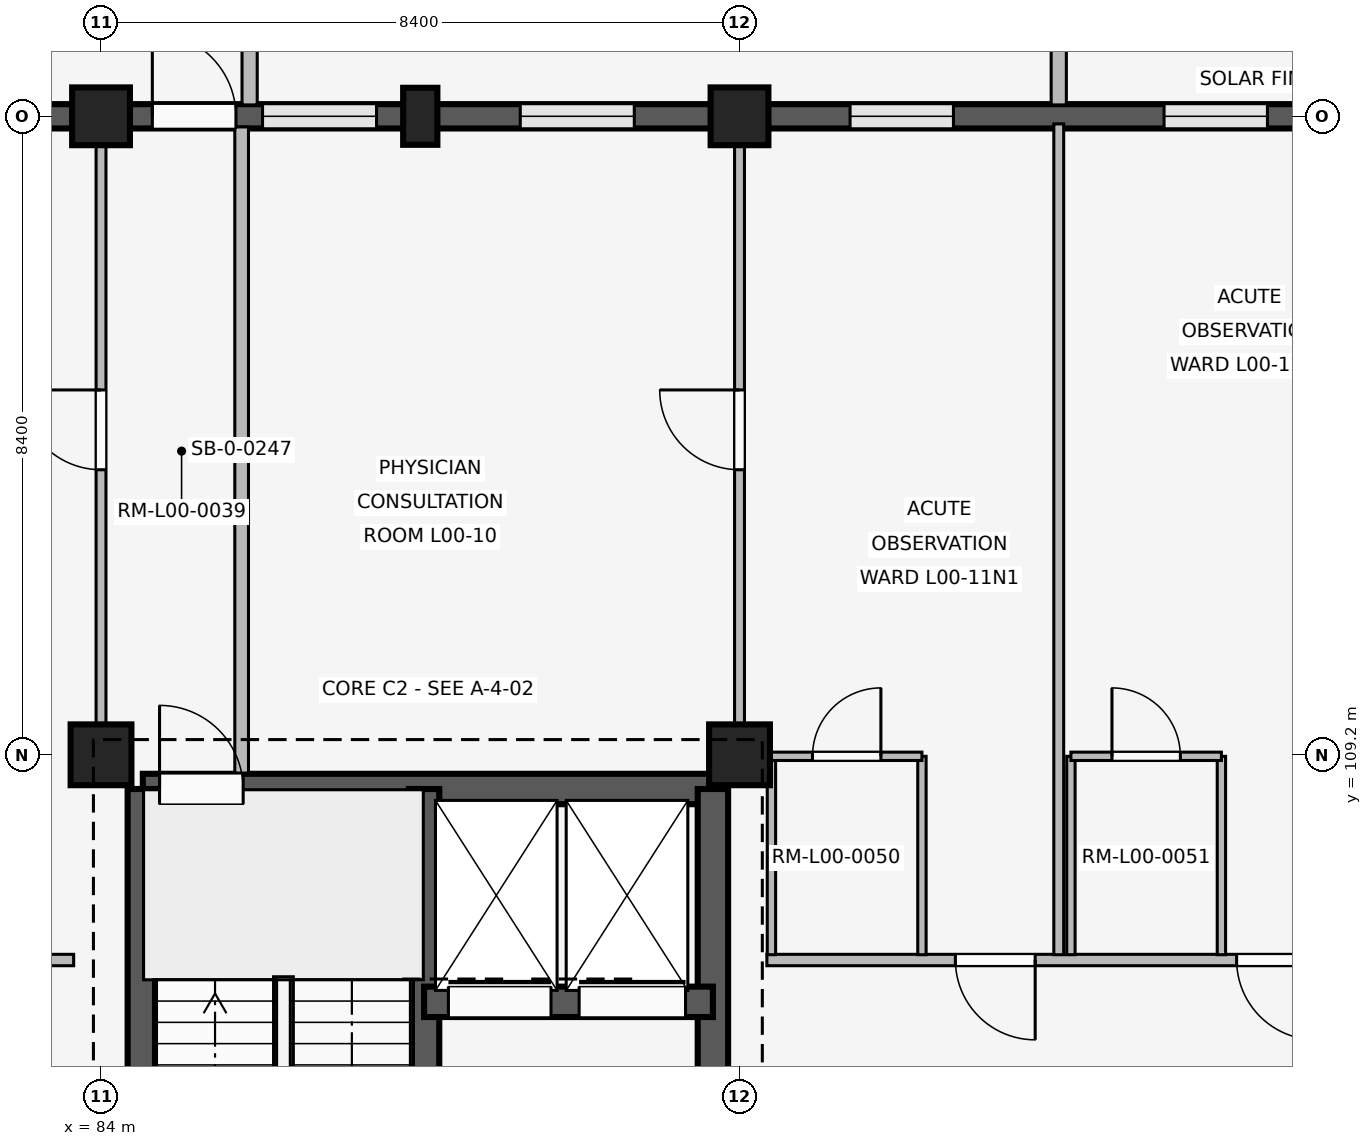
"""IFC4 building model, lengths in metres.
Left out: names, types, materials, properties, quantities, classifications, styles, units other than length and angle.
Written with IfcOpenShell. Run it as: python <this file> out.ifc"""

import sys

from ifc_helpers import new_model, si_unit, direction, frame, frame_2d, origin, origin_2d, place, context, subcontext, project, spatial, rectangle, extrude, element, fill, save


model = new_model("IFC4")
c1 = context("Model", 3, precision=1e-05, world=origin(), true_north=direction((0.0, 1.0)))
c2 = subcontext(c1, "Body", "Model", "MODEL_VIEW")
j1 = project(units=[si_unit("LENGTHUNIT", "METRE"), si_unit("PLANEANGLEUNIT", "RADIAN")], contexts=[c1])
p1 = place(None, origin())
s1 = spatial("IfcSite", under=j1, at=p1, CompositionType="ELEMENT")
p2 = place(p1, origin())
s2 = spatial("IfcBuilding", under=s1, at=p2, CompositionType="ELEMENT")
p3 = place(p2, origin())
s3 = spatial("IfcBuildingStorey", under=s2, at=p3, CompositionType="ELEMENT", Elevation=0.0)
p4 = place(p3, frame((84.0, 109.2, 0.0), z_axis=(0.0, 0.0, 1.0), x_axis=(1.0, 0.0, 0.0)))
e1 = element("IfcColumn", 1, at=p4, inside=s3, PredefinedType="COLUMN", context=c2, shape_type="SweptSolid", body=[
    extrude(rectangle(XDim=0.8, YDim=0.8, at=origin_2d()), origin(), (0.0, 0.0, 1.0), 4.8),
])
p5 = place(p3, frame((84.0, 117.6, 0.0), z_axis=(0.0, 0.0, 1.0), x_axis=(1.0, 0.0, 0.0)))
e2 = element("IfcColumn", 2, at=p5, inside=s3, PredefinedType="COLUMN", context=c2, shape_type="SweptSolid", body=[
    extrude(rectangle(XDim=0.76, YDim=0.76, at=origin_2d()), origin(), (0.0, 0.0, 1.0), 4.8),
])
p6 = place(p3, frame((92.4, 109.2, 0.0), z_axis=(0.0, 0.0, 1.0), x_axis=(1.0, 0.0, 0.0)))
e3 = element("IfcColumn", 3, at=p6, inside=s3, PredefinedType="COLUMN", context=c2, shape_type="SweptSolid", body=[
    extrude(rectangle(XDim=0.8, YDim=0.8, at=origin_2d()), origin(), (0.0, 0.0, 1.0), 4.8),
])
p7 = place(p3, frame((92.4, 117.6, 0.0), z_axis=(0.0, 0.0, 1.0), x_axis=(1.0, 0.0, 0.0)))
e4 = element("IfcColumn", 4, at=p7, inside=s3, PredefinedType="COLUMN", context=c2, shape_type="SweptSolid", body=[
    extrude(rectangle(XDim=0.76, YDim=0.76, at=origin_2d()), origin(), (0.0, 0.0, 1.0), 4.8),
])
p8 = place(p3, frame((88.2, 117.6, 0.0), z_axis=(0.0, 0.0, 1.0), x_axis=(1.0, 0.0, 0.0)))
e5 = element("IfcColumn", 5, at=p8, inside=s3, PredefinedType="PILASTER", context=c2, shape_type="SweptSolid", body=[
    extrude(rectangle(XDim=0.45, YDim=0.75, at=origin_2d()), origin(), (0.0, 0.0, 1.0), 4.8),
])
p9 = place(p3, frame((75.975, 117.6, 0.0), z_axis=(0.0, 0.0, 1.0), x_axis=(1.0, 0.0, 0.0)))
e6 = element("IfcWall", 6, at=p9, inside=s3, PredefinedType="SOLIDWALL", context=c2, shape_type="SweptSolid", body=[
    extrude(rectangle(XDim=7.65, YDim=0.32, at=frame_2d((3.825, 0.0))), origin(), (0.0, 0.0, 1.0), 3.82),
])
p10 = place(p9, frame((2.825, 0.0, 0.0)))
e7 = element("IfcOpeningElement", 7, at=p10, cuts=e6, PredefinedType="OPENING", context=c2, shape_type="SweptSolid", body=[
    extrude(rectangle(XDim=2.0, YDim=2.4, at=frame_2d((1.0, 1.2))), frame((0.0, 0.17, 0.0), z_axis=(0.0, -1.0, 0.0), x_axis=(1.0, 0.0, 0.0)), (0.0, 0.0, 1.0), 0.34),
])
p11 = place(p3, frame((84.375, 117.6, 0.0), z_axis=(0.0, 0.0, 1.0), x_axis=(1.0, 0.0, 0.0)))
e8 = element("IfcWall", 8, at=p11, inside=s3, PredefinedType="SOLIDWALL", context=c2, shape_type="SweptSolid", body=[
    extrude(rectangle(XDim=7.65, YDim=0.32, at=frame_2d((3.825, 0.0))), origin(), (0.0, 0.0, 1.0), 3.82),
])
p12 = place(p11, frame((0.3, 0.0, 0.0)))
e9 = element("IfcOpeningElement", 9, at=p12, cuts=e8, PredefinedType="OPENING", context=c2, shape_type="SweptSolid", body=[
    extrude(rectangle(XDim=1.1, YDim=2.15, at=frame_2d((0.55, 1.075))), frame((0.0, 0.17, 0.0), z_axis=(0.0, -1.0, 0.0), x_axis=(1.0, 0.0, 0.0)), (0.0, 0.0, 1.0), 0.34),
])
p13 = place(p11, frame((1.75, 0.0, 0.85)))
e10 = element("IfcOpeningElement", 10, at=p13, cuts=e8, PredefinedType="OPENING", context=c2, shape_type="SweptSolid", body=[
    extrude(rectangle(XDim=1.5, YDim=1.55, at=frame_2d((0.75, 0.775))), frame((0.0, 0.17, 0.0), z_axis=(0.0, -1.0, 0.0), x_axis=(1.0, 0.0, 0.0)), (0.0, 0.0, 1.0), 0.34),
])
p14 = place(p11, frame((5.14, 0.0, 0.85)))
e11 = element("IfcOpeningElement", 11, at=p14, cuts=e8, PredefinedType="OPENING", context=c2, shape_type="SweptSolid", body=[
    extrude(rectangle(XDim=1.5, YDim=1.55, at=frame_2d((0.75, 0.775))), frame((0.0, 0.17, 0.0), z_axis=(0.0, -1.0, 0.0), x_axis=(1.0, 0.0, 0.0)), (0.0, 0.0, 1.0), 0.34),
])
p15 = place(p3, frame((85.955, 117.75, 0.0), z_axis=(0.0, 0.0, 1.0), x_axis=(0.0, 1.0, 0.0)))
e12 = element("IfcWall", 12, at=p15, inside=s3, PredefinedType="ELEMENTEDWALL", context=c2, shape_type="SweptSolid", body=[
    extrude(rectangle(XDim=0.85, YDim=0.2, at=frame_2d((0.425, 0.0))), origin(), (0.0, 0.0, 1.0), 3.8),
])
p16 = place(p3, frame((92.775, 117.6, 0.0), z_axis=(0.0, 0.0, 1.0), x_axis=(1.0, 0.0, 0.0)))
e13 = element("IfcWall", 13, at=p16, inside=s3, PredefinedType="SOLIDWALL", context=c2, shape_type="SweptSolid", body=[
    extrude(rectangle(XDim=7.65, YDim=0.32, at=frame_2d((3.825, 0.0))), origin(), (0.0, 0.0, 1.0), 3.82),
])
p17 = place(p16, frame((1.08, 0.0, 0.85)))
e14 = element("IfcOpeningElement", 14, at=p17, cuts=e13, PredefinedType="OPENING", context=c2, shape_type="SweptSolid", body=[
    extrude(rectangle(XDim=1.36, YDim=1.42, at=frame_2d((0.68, 0.71))), frame((0.0, 0.17, 0.0), z_axis=(0.0, -1.0, 0.0), x_axis=(1.0, 0.0, 0.0)), (0.0, 0.0, 1.0), 0.34),
])
p18 = place(p16, frame((5.21, 0.0, 0.85)))
e15 = element("IfcOpeningElement", 15, at=p18, cuts=e13, PredefinedType="OPENING", context=c2, shape_type="SweptSolid", body=[
    extrude(rectangle(XDim=1.36, YDim=1.42, at=frame_2d((0.68, 0.71))), frame((0.0, 0.17, 0.0), z_axis=(0.0, -1.0, 0.0), x_axis=(1.0, 0.0, 0.0)), (0.0, 0.0, 1.0), 0.34),
])
p19 = place(p3, frame((96.6, 117.75, 0.0), z_axis=(0.0, 0.0, 1.0), x_axis=(0.0, 1.0, 0.0)))
e16 = element("IfcWall", 16, at=p19, inside=s3, PredefinedType="ELEMENTEDWALL", context=c2, shape_type="SweptSolid", body=[
    extrude(rectangle(XDim=0.85, YDim=0.2, at=frame_2d((0.425, 0.0))), origin(), (0.0, 0.0, 1.0), 3.8),
])
p20 = place(p3, frame((84.55, 108.75, 0.0), z_axis=(0.0, 0.0, 1.0), x_axis=(1.0, 0.0, 0.0)))
e17 = element("IfcWall", 17, at=p20, inside=s3, PredefinedType="SHEAR", context=c2, shape_type="SweptSolid", body=[
    extrude(rectangle(XDim=7.5, YDim=0.4, at=frame_2d((3.75, 0.0))), origin(), (0.0, 0.0, 1.0), 4.52),
])
p21 = place(p20, frame((0.22, 0.0, 0.0)))
e18 = element("IfcOpeningElement", 18, at=p21, cuts=e17, PredefinedType="OPENING", context=c2, shape_type="SweptSolid", body=[
    extrude(rectangle(XDim=1.1, YDim=2.1, at=frame_2d((0.55, 1.05))), frame((0.0, 0.21, 0.0), z_axis=(0.0, -1.0, 0.0), x_axis=(1.0, 0.0, 0.0)), (0.0, 0.0, 1.0), 0.42),
])
p22 = place(p3, frame((84.55, 101.2, 0.0), z_axis=(0.0, 0.0, 1.0), x_axis=(0.0, 1.0, 0.0)))
e19 = element("IfcWall", 19, at=p22, inside=s3, PredefinedType="SHEAR", context=c2, shape_type="SweptSolid", body=[
    extrude(rectangle(XDim=7.55, YDim=0.4, at=frame_2d((3.775, 0.0))), origin(), (0.0, 0.0, 1.0), 4.52),
])
p23 = place(p22, frame((0.28, 0.0, 0.0)))
e20 = element("IfcOpeningElement", 20, at=p23, cuts=e19, PredefinedType="OPENING", context=c2, shape_type="SweptSolid", body=[
    extrude(rectangle(XDim=1.0, YDim=2.15, at=frame_2d((0.5, 1.075))), frame((0.0, 0.21, 0.0), z_axis=(0.0, -1.0, 0.0), x_axis=(1.0, 0.0, 0.0)), (0.0, 0.0, 1.0), 0.42),
])
p24 = place(p3, frame((92.05, 101.2, 0.0), z_axis=(0.0, 0.0, 1.0), x_axis=(0.0, 1.0, 0.0)))
e21 = element("IfcWall", 21, at=p24, inside=s3, PredefinedType="SHEAR", context=c2, shape_type="SweptSolid", body=[
    extrude(rectangle(XDim=7.55, YDim=0.4, at=frame_2d((3.775, 0.0))), origin(), (0.0, 0.0, 1.0), 4.52),
])
p25 = place(p24, frame((2.4, 0.0, 0.0)))
e22 = element("IfcOpeningElement", 22, at=p25, cuts=e21, PredefinedType="OPENING", context=c2, shape_type="SweptSolid", body=[
    extrude(rectangle(XDim=1.2, YDim=2.2, at=frame_2d((0.6, 1.1))), frame((0.0, 0.21, 0.0), z_axis=(0.0, -1.0, 0.0), x_axis=(1.0, 0.0, 0.0)), (0.0, 0.0, 1.0), 0.42),
])
p26 = place(p3, frame((88.25, 101.2, 0.0), z_axis=(0.0, 0.0, 1.0), x_axis=(0.0, 1.0, 0.0)))
e23 = element("IfcWall", 23, at=p26, inside=s3, PredefinedType="SHEAR", context=c2, shape_type="SweptSolid", body=[
    extrude(rectangle(XDim=7.55, YDim=0.4, at=frame_2d((3.775, 0.0))), origin(), (0.0, 0.0, 1.0), 4.52),
])
p27 = place(p26, frame((0.28, 0.0, 0.0)))
e24 = element("IfcOpeningElement", 24, at=p27, cuts=e23, PredefinedType="OPENING", context=c2, shape_type="SweptSolid", body=[
    extrude(rectangle(XDim=1.0, YDim=2.15, at=frame_2d((0.5, 1.075))), frame((0.0, 0.21, 0.0), z_axis=(0.0, -1.0, 0.0), x_axis=(1.0, 0.0, 0.0)), (0.0, 0.0, 1.0), 0.42),
])
p28 = place(p3, frame((88.25, 105.95, 0.0), z_axis=(0.0, 0.0, 1.0), x_axis=(1.0, 0.0, 0.0)))
e25 = element("IfcWall", 25, at=p28, inside=s3, PredefinedType="SHEAR", context=c2, shape_type="SweptSolid", body=[
    extrude(rectangle(XDim=3.8, YDim=0.4, at=frame_2d((1.9, 0.0))), origin(), (0.0, 0.0, 1.0), 4.52),
])
p29 = place(p28, frame((0.32, 0.0, 0.0)))
e26 = element("IfcOpeningElement", 26, at=p29, cuts=e25, PredefinedType="OPENING", context=c2, shape_type="SweptSolid", body=[
    extrude(rectangle(XDim=1.35, YDim=2.25, at=frame_2d((0.675, 1.125))), frame((0.0, 0.21, 0.0), z_axis=(0.0, -1.0, 0.0), x_axis=(1.0, 0.0, 0.0)), (0.0, 0.0, 1.0), 0.42),
])
p30 = place(p28, frame((2.04, 0.0, 0.0)))
e27 = element("IfcOpeningElement", 27, at=p30, cuts=e25, PredefinedType="OPENING", context=c2, shape_type="SweptSolid", body=[
    extrude(rectangle(XDim=1.4, YDim=2.25, at=frame_2d((0.7, 1.125))), frame((0.0, 0.21, 0.0), z_axis=(0.0, -1.0, 0.0), x_axis=(1.0, 0.0, 0.0)), (0.0, 0.0, 1.0), 0.42),
])
p31 = place(p3, frame((83.64, 106.5, 0.0), z_axis=(0.0, 0.0, 1.0), x_axis=(-1.0, 0.0, 0.0)))
e28 = element("IfcWall", 28, at=p31, inside=s3, PredefinedType="PARTITIONING", context=c2, shape_type="SweptSolid", body=[
    extrude(rectangle(XDim=7.96, YDim=0.15, at=frame_2d((3.98, 0.0))), origin(), (0.0, 0.0, 1.0), 3.8),
])
p32 = place(p31, frame((3.355, 0.0, 0.0)))
e29 = element("IfcOpeningElement", 29, at=p32, cuts=e28, PredefinedType="OPENING", context=c2, shape_type="SweptSolid", body=[
    extrude(rectangle(XDim=1.25, YDim=2.2, at=frame_2d((0.625, 1.1))), frame((0.0, 0.085, 0.0), z_axis=(0.0, -1.0, 0.0), x_axis=(1.0, 0.0, 0.0)), (0.0, 0.0, 1.0), 0.17),
])
p33 = place(p3, frame((84.0, 109.55, 0.0), z_axis=(0.0, 0.0, 1.0), x_axis=(0.0, 1.0, 0.0)))
e30 = element("IfcWall", 30, at=p33, inside=s3, PredefinedType="PARTITIONING", context=c2, shape_type="SweptSolid", body=[
    extrude(rectangle(XDim=7.91, YDim=0.13, at=frame_2d((3.955, 0.0))), origin(), (0.0, 0.0, 1.0), 3.8),
])
p34 = place(p33, frame((3.4, 0.0, 0.0)))
e31 = element("IfcOpeningElement", 31, at=p34, cuts=e30, PredefinedType="OPENING", context=c2, shape_type="SweptSolid", body=[
    extrude(rectangle(XDim=1.05, YDim=2.2, at=frame_2d((0.525, 1.1))), frame((0.0, 0.075, 0.0), z_axis=(0.0, -1.0, 0.0), x_axis=(1.0, 0.0, 0.0)), (0.0, 0.0, 1.0), 0.15),
])
p35 = place(p3, frame((85.85, 108.96, 0.0), z_axis=(0.0, 0.0, 1.0), x_axis=(0.0, 1.0, 0.0)))
e32 = element("IfcWall", 32, at=p35, inside=s3, PredefinedType="PARTITIONING", context=c2, shape_type="SweptSolid", body=[
    extrude(rectangle(XDim=8.5, YDim=0.18, at=frame_2d((4.25, 0.0))), origin(), (0.0, 0.0, 1.0), 3.8),
])
p36 = place(p3, frame((92.4, 109.55, 0.0), z_axis=(0.0, 0.0, 1.0), x_axis=(0.0, 1.0, 0.0)))
e33 = element("IfcWall", 33, at=p36, inside=s3, PredefinedType="PARTITIONING", context=c2, shape_type="SweptSolid", body=[
    extrude(rectangle(XDim=7.91, YDim=0.13, at=frame_2d((3.955, 0.0))), origin(), (0.0, 0.0, 1.0), 3.8),
])
p37 = place(p36, frame((3.4, 0.0, 0.0)))
e34 = element("IfcOpeningElement", 34, at=p37, cuts=e33, PredefinedType="OPENING", context=c2, shape_type="SweptSolid", body=[
    extrude(rectangle(XDim=1.05, YDim=2.2, at=frame_2d((0.525, 1.1))), frame((0.0, 0.075, 0.0), z_axis=(0.0, -1.0, 0.0), x_axis=(1.0, 0.0, 0.0)), (0.0, 0.0, 1.0), 0.15),
])
p38 = place(p3, frame((100.72, 106.5, 0.0), z_axis=(0.0, 0.0, 1.0), x_axis=(-1.0, 0.0, 0.0)))
e35 = element("IfcWall", 35, at=p38, inside=s3, PredefinedType="PARTITIONING", context=c2, shape_type="SweptSolid", body=[
    extrude(rectangle(XDim=7.96, YDim=0.15, at=frame_2d((3.98, 0.0))), origin(), (0.0, 0.0, 1.0), 3.8),
])
p39 = place(p38, frame((0.73, 0.0, 0.0)))
e36 = element("IfcOpeningElement", 36, at=p39, cuts=e35, PredefinedType="OPENING", context=c2, shape_type="SweptSolid", body=[
    extrude(rectangle(XDim=1.05, YDim=2.2, at=frame_2d((0.525, 1.1))), frame((0.0, 0.085, 0.0), z_axis=(0.0, -1.0, 0.0), x_axis=(1.0, 0.0, 0.0)), (0.0, 0.0, 1.0), 0.17),
])
p40 = place(p38, frame((4.43, 0.0, 0.0)))
e37 = element("IfcOpeningElement", 37, at=p40, cuts=e35, PredefinedType="OPENING", context=c2, shape_type="SweptSolid", body=[
    extrude(rectangle(XDim=1.05, YDim=2.2, at=frame_2d((0.525, 1.1))), frame((0.0, 0.085, 0.0), z_axis=(0.0, -1.0, 0.0), x_axis=(1.0, 0.0, 0.0)), (0.0, 0.0, 1.0), 0.17),
])
p41 = place(p3, frame((96.6, 106.57, 0.0), z_axis=(0.0, 0.0, 1.0), x_axis=(0.0, 1.0, 0.0)))
e38 = element("IfcWall", 38, at=p41, inside=s3, PredefinedType="PARTITIONING", context=c2, shape_type="SweptSolid", body=[
    extrude(rectangle(XDim=10.93, YDim=0.13, at=frame_2d((5.465, 0.0))), origin(), (0.0, 0.0, 1.0), 3.8),
])
for number, where, z_axis, x_axis in (
    (39, (92.82, 106.57, 0.0), (0.0, 0.0, 1.0), (0.0, 1.0, 0.0)),
    (40, (94.8, 106.57, 0.0), (0.0, 0.0, 1.0), (0.0, 1.0, 0.0)),
):
    element("IfcWall", number, at=place(p3, frame(where, z_axis=z_axis, x_axis=x_axis)), inside=s3, PredefinedType="PARTITIONING", context=c2, shape_type="SweptSolid", body=[
        extrude(rectangle(XDim=2.61, YDim=0.11, at=frame_2d((1.305, 0.0))), origin(), (0.0, 0.0, 1.0), 3.8),
    ])
p42 = place(p3, frame((92.82, 109.18, 0.0), z_axis=(0.0, 0.0, 1.0), x_axis=(1.0, 0.0, 0.0)))
e41 = element("IfcWall", 41, at=p42, inside=s3, PredefinedType="PARTITIONING", context=c2, shape_type="SweptSolid", body=[
    extrude(rectangle(XDim=1.98, YDim=0.11, at=frame_2d((0.99, 0.0))), origin(), (0.0, 0.0, 1.0), 3.8),
])
p43 = place(p42, frame((0.54, 0.0, 0.0)))
e42 = element("IfcOpeningElement", 42, at=p43, cuts=e41, PredefinedType="OPENING", context=c2, shape_type="SweptSolid", body=[
    extrude(rectangle(XDim=0.9, YDim=2.1, at=frame_2d((0.45, 1.05))), frame((0.0, 0.065, 0.0), z_axis=(0.0, -1.0, 0.0), x_axis=(1.0, 0.0, 0.0)), (0.0, 0.0, 1.0), 0.13),
])
for number, where, z_axis, x_axis in (
    (43, (96.76, 106.57, 0.0), (0.0, 0.0, 1.0), (0.0, 1.0, 0.0)),
    (44, (98.74, 106.57, 0.0), (0.0, 0.0, 1.0), (0.0, 1.0, 0.0)),
):
    element("IfcWall", number, at=place(p3, frame(where, z_axis=z_axis, x_axis=x_axis)), inside=s3, PredefinedType="PARTITIONING", context=c2, shape_type="SweptSolid", body=[
        extrude(rectangle(XDim=2.61, YDim=0.11, at=frame_2d((1.305, 0.0))), origin(), (0.0, 0.0, 1.0), 3.8),
    ])
p44 = place(p3, frame((96.76, 109.18, 0.0), z_axis=(0.0, 0.0, 1.0), x_axis=(1.0, 0.0, 0.0)))
e45 = element("IfcWall", 45, at=p44, inside=s3, PredefinedType="PARTITIONING", context=c2, shape_type="SweptSolid", body=[
    extrude(rectangle(XDim=1.98, YDim=0.11, at=frame_2d((0.99, 0.0))), origin(), (0.0, 0.0, 1.0), 3.8),
])
p45 = place(p44, frame((0.54, 0.0, 0.0)))
e46 = element("IfcOpeningElement", 46, at=p45, cuts=e45, PredefinedType="OPENING", context=c2, shape_type="SweptSolid", body=[
    extrude(rectangle(XDim=0.9, YDim=2.1, at=frame_2d((0.45, 1.05))), frame((0.0, 0.065, 0.0), z_axis=(0.0, -1.0, 0.0), x_axis=(1.0, 0.0, 0.0)), (0.0, 0.0, 1.0), 0.13),
])
p46 = place(p12, origin())
e47 = element("IfcDoor", 47, at=p46, inside=s3, OperationType="SINGLE_SWING_LEFT", PredefinedType="DOOR", context=c2, shape_type="SweptSolid", body=[
    extrude(rectangle(XDim=1.1, YDim=2.15, at=frame_2d((0.55, 1.075))), frame((0.0, 0.025, 0.0), z_axis=(0.0, -1.0, 0.0), x_axis=(1.0, 0.0, 0.0)), (0.0, 0.0, 1.0), 0.05),
])
fill(e9, e47)
p47 = place(p13, origin())
e48 = element("IfcWindow", 48, at=p47, inside=s3, PartitioningType="SINGLE_PANEL", PredefinedType="WINDOW", context=c2, shape_type="SweptSolid", body=[
    extrude(rectangle(XDim=1.5, YDim=1.55, at=frame_2d((0.75, 0.775))), frame((0.0, 0.03, 0.0), z_axis=(0.0, -1.0, 0.0), x_axis=(1.0, 0.0, 0.0)), (0.0, 0.0, 1.0), 0.06),
])
fill(e10, e48)
p48 = place(p14, origin())
e49 = element("IfcWindow", 49, at=p48, inside=s3, PartitioningType="SINGLE_PANEL", PredefinedType="WINDOW", context=c2, shape_type="SweptSolid", body=[
    extrude(rectangle(XDim=1.5, YDim=1.55, at=frame_2d((0.75, 0.775))), frame((0.0, 0.03, 0.0), z_axis=(0.0, -1.0, 0.0), x_axis=(1.0, 0.0, 0.0)), (0.0, 0.0, 1.0), 0.06),
])
fill(e11, e49)
p49 = place(p17, origin())
e50 = element("IfcWindow", 50, at=p49, inside=s3, PartitioningType="SINGLE_PANEL", PredefinedType="WINDOW", context=c2, shape_type="SweptSolid", body=[
    extrude(rectangle(XDim=1.36, YDim=1.42, at=frame_2d((0.68, 0.71))), frame((0.0, 0.03, 0.0), z_axis=(0.0, -1.0, 0.0), x_axis=(1.0, 0.0, 0.0)), (0.0, 0.0, 1.0), 0.06),
])
fill(e14, e50)
p50 = place(p18, origin())
e51 = element("IfcWindow", 51, at=p50, inside=s3, PartitioningType="SINGLE_PANEL", PredefinedType="WINDOW", context=c2, shape_type="SweptSolid", body=[
    extrude(rectangle(XDim=1.36, YDim=1.42, at=frame_2d((0.68, 0.71))), frame((0.0, 0.03, 0.0), z_axis=(0.0, -1.0, 0.0), x_axis=(1.0, 0.0, 0.0)), (0.0, 0.0, 1.0), 0.06),
])
fill(e15, e51)
p51 = place(p21, origin())
e52 = element("IfcDoor", 52, at=p51, inside=s3, OperationType="SINGLE_SWING_LEFT", PredefinedType="DOOR", context=c2, shape_type="SweptSolid", body=[
    extrude(rectangle(XDim=1.1, YDim=2.1, at=frame_2d((0.55, 1.05))), frame((0.0, 0.025, 0.0), z_axis=(0.0, -1.0, 0.0), x_axis=(1.0, 0.0, 0.0)), (0.0, 0.0, 1.0), 0.05),
])
fill(e18, e52)
p52 = place(p29, origin())
e53 = element("IfcDoor", 53, at=p52, inside=s3, OperationType="SLIDING_TO_LEFT", PredefinedType="DOOR", context=c2, shape_type="SweptSolid", body=[
    extrude(rectangle(XDim=1.35, YDim=2.25, at=frame_2d((0.675, 1.125))), frame((0.0, 0.025, 0.0), z_axis=(0.0, -1.0, 0.0), x_axis=(1.0, 0.0, 0.0)), (0.0, 0.0, 1.0), 0.05),
])
fill(e26, e53)
p53 = place(p30, origin())
e54 = element("IfcDoor", 54, at=p53, inside=s3, OperationType="SLIDING_TO_LEFT", PredefinedType="DOOR", context=c2, shape_type="SweptSolid", body=[
    extrude(rectangle(XDim=1.4, YDim=2.25, at=frame_2d((0.7, 1.125))), frame((0.0, 0.025, 0.0), z_axis=(0.0, -1.0, 0.0), x_axis=(1.0, 0.0, 0.0)), (0.0, 0.0, 1.0), 0.05),
])
fill(e27, e54)
p54 = place(p34, origin())
e55 = element("IfcDoor", 55, at=p54, inside=s3, OperationType="SINGLE_SWING_RIGHT", PredefinedType="DOOR", context=c2, shape_type="SweptSolid", body=[
    extrude(rectangle(XDim=1.05, YDim=2.2, at=frame_2d((0.525, 1.1))), frame((0.0, 0.025, 0.0), z_axis=(0.0, -1.0, 0.0), x_axis=(1.0, 0.0, 0.0)), (0.0, 0.0, 1.0), 0.05),
])
fill(e31, e55)
p55 = place(p37, origin())
e56 = element("IfcDoor", 56, at=p55, inside=s3, OperationType="SINGLE_SWING_RIGHT", PredefinedType="DOOR", context=c2, shape_type="SweptSolid", body=[
    extrude(rectangle(XDim=1.05, YDim=2.2, at=frame_2d((0.525, 1.1))), frame((0.0, 0.025, 0.0), z_axis=(0.0, -1.0, 0.0), x_axis=(1.0, 0.0, 0.0)), (0.0, 0.0, 1.0), 0.05),
])
fill(e34, e56)
p56 = place(p39, origin())
e57 = element("IfcDoor", 57, at=p56, inside=s3, OperationType="SINGLE_SWING_LEFT", PredefinedType="DOOR", context=c2, shape_type="SweptSolid", body=[
    extrude(rectangle(XDim=1.05, YDim=2.2, at=frame_2d((0.525, 1.1))), frame((0.0, 0.025, 0.0), z_axis=(0.0, -1.0, 0.0), x_axis=(1.0, 0.0, 0.0)), (0.0, 0.0, 1.0), 0.05),
])
fill(e36, e57)
p57 = place(p40, origin())
e58 = element("IfcDoor", 58, at=p57, inside=s3, OperationType="SINGLE_SWING_LEFT", PredefinedType="DOOR", context=c2, shape_type="SweptSolid", body=[
    extrude(rectangle(XDim=1.05, YDim=2.2, at=frame_2d((0.525, 1.1))), frame((0.0, 0.025, 0.0), z_axis=(0.0, -1.0, 0.0), x_axis=(1.0, 0.0, 0.0)), (0.0, 0.0, 1.0), 0.05),
])
fill(e37, e58)
p58 = place(p43, origin())
e59 = element("IfcDoor", 59, at=p58, inside=s3, OperationType="SINGLE_SWING_RIGHT", PredefinedType="DOOR", context=c2, shape_type="SweptSolid", body=[
    extrude(rectangle(XDim=0.9, YDim=2.1, at=frame_2d((0.45, 1.05))), frame((0.0, 0.025, 0.0), z_axis=(0.0, -1.0, 0.0), x_axis=(1.0, 0.0, 0.0)), (0.0, 0.0, 1.0), 0.05),
])
fill(e42, e59)
p59 = place(p45, origin())
e60 = element("IfcDoor", 60, at=p59, inside=s3, OperationType="SINGLE_SWING_LEFT", PredefinedType="DOOR", context=c2, shape_type="SweptSolid", body=[
    extrude(rectangle(XDim=0.9, YDim=2.1, at=frame_2d((0.45, 1.05))), frame((0.0, 0.025, 0.0), z_axis=(0.0, -1.0, 0.0), x_axis=(1.0, 0.0, 0.0)), (0.0, 0.0, 1.0), 0.05),
])
fill(e46, e60)
save(model, sys.argv[1])
